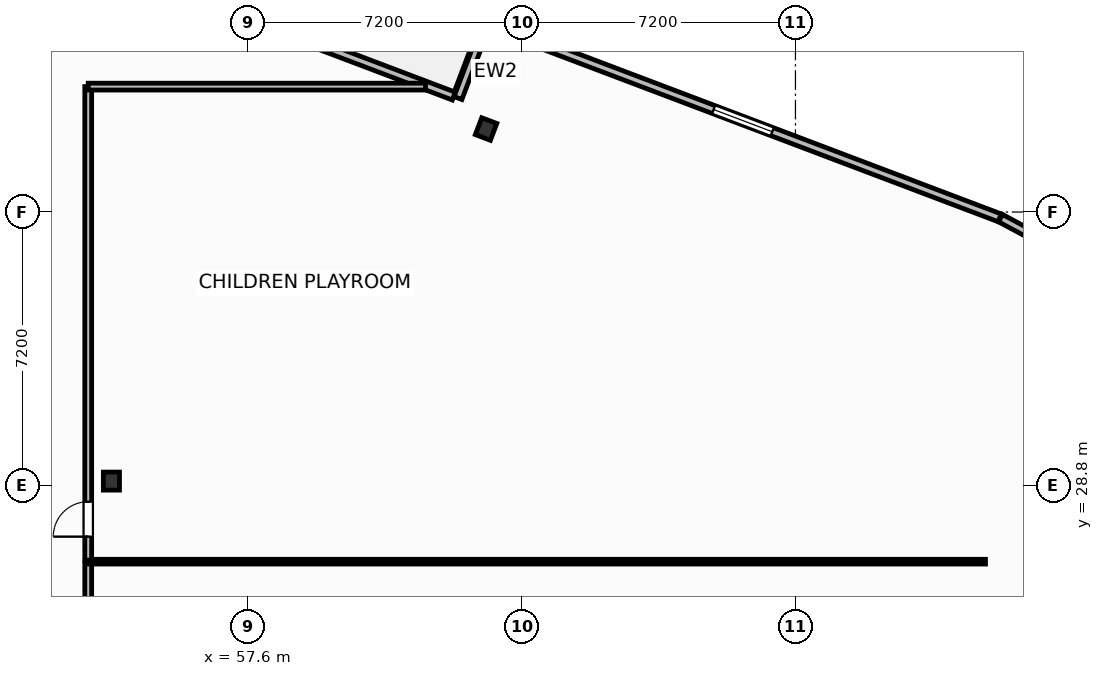
"""IFC4 building model, lengths in metres.
Left out: names, types, materials, properties, quantities, classifications, styles, units other than length and angle.
Written with IfcOpenShell. Run it as: python <this file> out.ifc"""

import sys

from ifc_helpers import new_model, si_unit, direction, frame, frame_2d, origin, origin_2d, place, context, subcontext, project, spatial, rectangle, i_section, extrude, element, fill, save


model = new_model("IFC4")
c1 = context("Model", 3, precision=1e-05, world=origin(), true_north=direction((0.0, 1.0)))
c2 = subcontext(c1, "Body", "Model", "MODEL_VIEW")
j1 = project(units=[si_unit("LENGTHUNIT", "METRE"), si_unit("PLANEANGLEUNIT", "RADIAN")], contexts=[c1])
p1 = place(None, origin())
s1 = spatial("IfcSite", under=j1, at=p1, CompositionType="ELEMENT")
p2 = place(p1, origin())
s2 = spatial("IfcBuilding", under=s1, at=p2, CompositionType="ELEMENT")
p3 = place(p2, frame((0.0, 0.0, 76.2)))
s3 = spatial("IfcBuildingStorey", under=s2, at=p3, CompositionType="ELEMENT", Elevation=76.2)
for number, where, z_axis, x_axis in (
    (1, (54.0, 28.92, 0.0), (0.0, 0.0, 1.0), (1.0, 0.0, 0.0)),
    (2, (63.859, 38.184, 0.0), (0.0, 0.0, 1.0), (0.935, -0.354, 0.0)),
):
    element("IfcColumn", number, at=place(p3, frame(where, z_axis=z_axis, x_axis=x_axis)), inside=s3, PredefinedType="COLUMN", context=c2, shape_type="SweptSolid", body=[
        extrude(i_section(OverallWidth=0.424, OverallDepth=0.474, WebThickness=0.048, FlangeThickness=0.077, FilletRadius=0.025, at=origin_2d()), origin(), (0.0, 0.0, 1.0), 3.7),
    ])
p4 = place(p3, frame((57.399, 41.175, 0.0), z_axis=(0.0, 0.0, 1.0), x_axis=(0.935227640088, -0.354046976001, 0.0)))
e3 = element("IfcWall", 3, at=p4, inside=s3, PredefinedType="SOLIDWALL", context=c2, shape_type="SweptSolid", body=[
    extrude(rectangle(XDim=6.0, YDim=0.22, at=frame_2d((3.0, 0.0))), origin(), (0.0, 0.0, 1.0), 2.73),
])
p5 = place(p4, frame((0.4, 0.0, 0.0)))
e4 = element("IfcOpeningElement", 4, at=p5, cuts=e3, PredefinedType="OPENING", context=c2, shape_type="SweptSolid", body=[
    extrude(rectangle(XDim=1.5, YDim=2.25, at=frame_2d((0.75, 1.125))), frame((0.0, 0.12, 0.0), z_axis=(0.0, -1.0, 0.0), x_axis=(1.0, 0.0, 0.0)), (0.0, 0.0, 1.0), 0.24),
])
p6 = place(p3, frame((78.597, 35.194, 0.0), z_axis=(0.0, 0.0, 1.0), x_axis=(-0.880948732004, 0.473211719614, 0.0)))
e5 = element("IfcWall", 5, at=p6, inside=s3, PredefinedType="SOLIDWALL", context=c2, shape_type="SweptSolid", body=[
    extrude(rectangle(XDim=1.361, YDim=0.22, at=frame_2d((0.681, 0.0))), origin(), (0.0, 0.0, 1.0), 2.73),
])
p7 = place(p3, frame((77.375, 35.847, 0.0), z_axis=(0.0, 0.0, 1.0), x_axis=(-0.935222448475, 0.354060689526, 0.0)))
e6 = element("IfcWall", 6, at=p7, inside=s3, PredefinedType="SOLIDWALL", context=c2, shape_type="SweptSolid", body=[
    extrude(rectangle(XDim=14.447, YDim=0.22, at=frame_2d((7.224, 0.0))), origin(), (0.0, 0.0, 1.0), 2.73),
])
p8 = place(p7, frame((6.399, 0.0, 0.8)))
e7 = element("IfcOpeningElement", 7, at=p8, cuts=e6, PredefinedType="OPENING", context=c2, shape_type="SweptSolid", body=[
    extrude(rectangle(XDim=1.65, YDim=1.65, at=frame_2d((0.825, 0.825))), frame((0.0, 0.12, 0.0), z_axis=(0.0, -1.0, 0.0), x_axis=(1.0, 0.0, 0.0)), (0.0, 0.0, 1.0), 0.24),
])
p9 = place(p3, frame((63.819, 40.845, 0.0), z_axis=(0.0, 0.0, 1.0), x_axis=(-0.354128791944, -0.935196663123, 0.0)))
e8 = element("IfcWall", 8, at=p9, inside=s3, PredefinedType="SOLIDWALL", context=c2, shape_type="SweptSolid", body=[
    extrude(rectangle(XDim=1.975, YDim=0.22, at=frame_2d((0.988, 0.0))), origin(), (0.0, 0.0, 1.0), 2.73),
])
p10 = place(p3, frame((53.39, 19.24, 0.0), z_axis=(0.0, 0.0, 1.0), x_axis=(0.0, 1.0, 0.0)))
e9 = element("IfcWall", 9, at=p10, inside=s3, PredefinedType="PARTITIONING", context=c2, shape_type="SweptSolid", body=[
    extrude(rectangle(XDim=7.52, YDim=0.18, at=frame_2d((3.76, 0.0))), origin(), (0.0, 0.0, 1.0), 3.45),
])
p11 = place(p10, frame((2.1, 0.0, 0.0)))
e10 = element("IfcOpeningElement", 10, at=p11, cuts=e9, PredefinedType="OPENING", context=c2, shape_type="SweptSolid", body=[
    extrude(rectangle(XDim=0.92, YDim=2.05, at=frame_2d((0.46, 1.025))), frame((0.0, 0.1, 0.0), z_axis=(0.0, -1.0, 0.0), x_axis=(1.0, 0.0, 0.0)), (0.0, 0.0, 1.0), 0.2),
])
p12 = place(p3, frame((53.39, 26.8, 0.0), z_axis=(0.0, 0.0, 1.0), x_axis=(1.0, 0.0, 0.0)))
e11 = element("IfcWall", 11, at=p12, inside=s3, PredefinedType="PARTITIONING", context=c2, shape_type="SweptSolid", body=[
    extrude(rectangle(XDim=23.61, YDim=0.125, at=frame_2d((11.805, 0.0))), origin(), (0.0, 0.0, 1.0), 3.45),
])
p13 = place(p3, frame((53.39, 26.84, 0.0), z_axis=(0.0, 0.0, 1.0), x_axis=(0.0, 1.0, 0.0)))
e12 = element("IfcWall", 12, at=p13, inside=s3, PredefinedType="PARTITIONING", context=c2, shape_type="SweptSolid", body=[
    extrude(rectangle(XDim=12.46, YDim=0.18, at=frame_2d((6.23, 0.0))), origin(), (0.0, 0.0, 1.0), 3.45),
])
p14 = place(p13, frame((0.618, 0.0, 0.0)))
e13 = element("IfcOpeningElement", 13, at=p14, cuts=e12, PredefinedType="OPENING", context=c2, shape_type="SweptSolid", body=[
    extrude(rectangle(XDim=0.92, YDim=2.05, at=frame_2d((0.46, 1.025))), frame((0.0, 0.1, 0.0), z_axis=(0.0, -1.0, 0.0), x_axis=(1.0, 0.0, 0.0)), (0.0, 0.0, 1.0), 0.2),
])
p15 = place(p3, frame((53.39, 39.3, 0.0), z_axis=(0.0, 0.0, 1.0), x_axis=(1.0, 0.0, 0.0)))
e14 = element("IfcWall", 14, at=p15, inside=s3, PredefinedType="PARTITIONING", context=c2, shape_type="SweptSolid", body=[
    extrude(rectangle(XDim=8.876, YDim=0.18, at=frame_2d((4.438, 0.0))), origin(), (0.0, 0.0, 1.0), 3.45),
])
p16 = place(p8, origin())
e15 = element("IfcWindow", 15, at=p16, inside=s3, PartitioningType="SINGLE_PANEL", PredefinedType="WINDOW", context=c2, shape_type="SweptSolid", body=[
    extrude(rectangle(XDim=1.65, YDim=1.65, at=frame_2d((0.825, 0.825))), frame((0.0, 0.03, 0.0), z_axis=(0.0, -1.0, 0.0), x_axis=(1.0, 0.0, 0.0)), (0.0, 0.0, 1.0), 0.06),
])
fill(e7, e15)
p17 = place(p14, origin())
e16 = element("IfcDoor", 16, at=p17, inside=s3, OperationType="SINGLE_SWING_LEFT", PredefinedType="DOOR", context=c2, shape_type="SweptSolid", body=[
    extrude(rectangle(XDim=0.92, YDim=2.05, at=frame_2d((0.46, 1.025))), frame((0.0, 0.025, 0.0), z_axis=(0.0, -1.0, 0.0), x_axis=(1.0, 0.0, 0.0)), (0.0, 0.0, 1.0), 0.05),
])
fill(e13, e16)
save(model, sys.argv[1])
